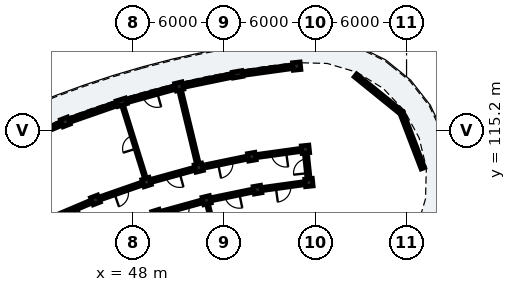
"""IFC4 building model, lengths in metres.
Left out: names, types, materials, properties, quantities, classifications, styles, units other than length and angle.
Written with IfcOpenShell. Run it as: python <this file> out.ifc"""

import sys

from ifc_helpers import new_model, si_unit, direction, frame, frame_2d, origin, origin_2d, place, context, subcontext, project, spatial, rectangle, extrude, element, fill, save


model = new_model("IFC4")
c1 = context("Model", 3, precision=1e-05, world=origin(), true_north=direction((0.0, 1.0)))
c2 = subcontext(c1, "Body", "Model", "MODEL_VIEW")
j1 = project(units=[si_unit("LENGTHUNIT", "METRE"), si_unit("PLANEANGLEUNIT", "RADIAN")], contexts=[c1])
p1 = place(None, origin())
s1 = spatial("IfcSite", under=j1, at=p1, CompositionType="ELEMENT")
p2 = place(p1, origin())
s2 = spatial("IfcBuilding", under=s1, at=p2, CompositionType="ELEMENT")
p3 = place(p2, frame((0.0, 0.0, 29.0)))
s3 = spatial("IfcBuildingStorey", under=s2, at=p3, CompositionType="ELEMENT", Elevation=29.0)
for number, where, z_axis, x_axis in (
    (1, (59.58, 111.766, 0.0), (0.0, 0.0, 1.0), (-0.105, 0.995, 0.0)),
    (2, (59.35, 113.954, 0.0), (0.0, 0.0, 1.0), (-0.105, 0.995, 0.0)),
    (3, (58.775, 119.424, 0.0), (0.0, 0.0, 1.0), (-0.105, 0.995, 0.0)),
    (4, (56.194, 111.297, 0.0), (0.0, 0.0, 1.0), (-0.17, 0.985, 0.0)),
    (5, (55.821, 113.465, 0.0), (0.0, 0.0, 1.0), (-0.17, 0.985, 0.0)),
):
    element("IfcColumn", number, at=place(p3, frame(where, z_axis=z_axis, x_axis=x_axis)), inside=s3, PredefinedType="COLUMN", context=c2, shape_type="SweptSolid", body=[
        extrude(rectangle(XDim=0.5, YDim=0.5, at=origin_2d()), origin(), (0.0, 0.0, 1.0), 3.115),
    ])
p4 = place(p3, frame((54.887, 118.885, 0.0), z_axis=(0.0, 0.0, 1.0), x_axis=(-0.169827298811, 0.985473839622, 0.0)))
e6 = element("IfcColumn", 6, at=p4, inside=s3, PredefinedType="PILASTER", context=c2, shape_type="SweptSolid", body=[
    extrude(rectangle(XDim=0.39, YDim=0.63, at=origin_2d()), origin(), (0.0, 0.0, 1.0), 3.115),
])
for number, where, z_axis, x_axis in (
    (7, (52.847, 110.606, 0.0), (0.0, 0.0, 1.0), (-0.234, 0.972, 0.0)),
    (8, (52.331, 112.744, 0.0), (0.0, 0.0, 1.0), (-0.234, 0.972, 0.0)),
    (9, (51.042, 118.091, 0.0), (0.0, 0.0, 1.0), (-0.234, 0.972, 0.0)),
    (10, (49.552, 109.695, 0.0), (0.0, 0.0, 1.0), (-0.298, 0.955, 0.0)),
    (11, (48.897, 111.795, 0.0), (0.0, 0.0, 1.0), (-0.298, 0.955, 0.0)),
):
    element("IfcColumn", number, at=place(p3, frame(where, z_axis=z_axis, x_axis=x_axis)), inside=s3, PredefinedType="COLUMN", context=c2, shape_type="SweptSolid", body=[
        extrude(rectangle(XDim=0.5, YDim=0.5, at=origin_2d()), origin(), (0.0, 0.0, 1.0), 3.115),
    ])
p5 = place(p3, frame((47.258, 117.046, 0.0), z_axis=(0.0, 0.0, 1.0), x_axis=(-0.297930292146, 0.954587628781, 0.0)))
e12 = element("IfcColumn", 12, at=p5, inside=s3, PredefinedType="PILASTER", context=c2, shape_type="SweptSolid", body=[
    extrude(rectangle(XDim=0.39, YDim=0.63, at=origin_2d()), origin(), (0.0, 0.0, 1.0), 3.115),
])
for number, where, z_axis, x_axis in (
    (13, (45.532, 110.622, 0.0), (0.0, 0.0, 1.0), (-0.36, 0.933, 0.0)),
    (14, (43.552, 115.753, 0.0), (0.0, 0.0, 1.0), (-0.36, 0.933, 0.0)),
):
    element("IfcColumn", number, at=place(p3, frame(where, z_axis=z_axis, x_axis=x_axis)), inside=s3, PredefinedType="COLUMN", context=c2, shape_type="SweptSolid", body=[
        extrude(rectangle(XDim=0.5, YDim=0.5, at=origin_2d()), origin(), (0.0, 0.0, 1.0), 3.115),
    ])
p6 = place(p3, frame((58.557, 119.394, 0.0), z_axis=(0.0, 0.0, 1.0), x_axis=(-0.990540496422, -0.137220716177, 0.0)))
e15 = element("IfcWall", 15, at=p6, inside=s3, PredefinedType="SOLIDWALL", context=c2, shape_type="SweptSolid", body=[
    extrude(rectangle(XDim=3.541, YDim=0.245, at=frame_2d((1.77, 0.0))), origin(), (0.0, 0.0, 1.0), 2.355),
])
p7 = place(p6, frame((0.995, 0.0, 0.35)))
e16 = element("IfcOpeningElement", 16, at=p7, cuts=e15, PredefinedType="OPENING", context=c2, shape_type="SweptSolid", body=[
    extrude(rectangle(XDim=1.55, YDim=1.75, at=frame_2d((0.775, 0.875))), frame((0.0, 0.133, 0.0), z_axis=(0.0, -1.0, 0.0), x_axis=(1.0, 0.0, 0.0)), (0.0, 0.0, 1.0), 0.265),
])
p8 = place(p3, frame((54.725, 118.852, 0.0), z_axis=(0.0, 0.0, 1.0), x_axis=(-0.979336300967, -0.202238496848, 0.0)))
e17 = element("IfcWall", 17, at=p8, inside=s3, PredefinedType="SOLIDWALL", context=c2, shape_type="SweptSolid", body=[
    extrude(rectangle(XDim=3.541, YDim=0.245, at=frame_2d((1.771, 0.0))), origin(), (0.0, 0.0, 1.0), 2.355),
])
p9 = place(p8, frame((0.92, 0.0, 0.35)))
e18 = element("IfcOpeningElement", 18, at=p9, cuts=e17, PredefinedType="OPENING", context=c2, shape_type="SweptSolid", body=[
    extrude(rectangle(XDim=1.7, YDim=1.8, at=frame_2d((0.85, 0.9))), frame((0.0, 0.133, 0.0), z_axis=(0.0, -1.0, 0.0), x_axis=(1.0, 0.0, 0.0)), (0.0, 0.0, 1.0), 0.265),
])
p10 = place(p3, frame((50.83, 118.032, 0.0), z_axis=(0.0, 0.0, 1.0), x_axis=(-0.963891366843, -0.266295762125, 0.0)))
e19 = element("IfcWall", 19, at=p10, inside=s3, PredefinedType="SOLIDWALL", context=c2, shape_type="SweptSolid", body=[
    extrude(rectangle(XDim=3.541, YDim=0.245, at=frame_2d((1.771, 0.0))), origin(), (0.0, 0.0, 1.0), 2.355),
])
p11 = place(p10, frame((1.28, 0.0, 0.0)))
e20 = element("IfcOpeningElement", 20, at=p11, cuts=e19, PredefinedType="OPENING", context=c2, shape_type="SweptSolid", body=[
    extrude(rectangle(XDim=0.98, YDim=2.12, at=frame_2d((0.49, 1.06))), frame((0.0, 0.133, 0.0), z_axis=(0.0, -1.0, 0.0), x_axis=(1.0, 0.0, 0.0)), (0.0, 0.0, 1.0), 0.265),
])
p12 = place(p3, frame((47.103, 116.991, 0.0), z_axis=(0.0, 0.0, 1.0), x_axis=(-0.944250036963, -0.329229202373, 0.0)))
e21 = element("IfcWall", 21, at=p12, inside=s3, PredefinedType="SOLIDWALL", context=c2, shape_type="SweptSolid", body=[
    extrude(rectangle(XDim=3.541, YDim=0.245, at=frame_2d((1.771, 0.0))), origin(), (0.0, 0.0, 1.0), 2.355),
])
p13 = place(p12, frame((1.08, 0.0, 0.55)))
e22 = element("IfcOpeningElement", 22, at=p13, cuts=e21, PredefinedType="OPENING", context=c2, shape_type="SweptSolid", body=[
    extrude(rectangle(XDim=1.38, YDim=1.56, at=frame_2d((0.69, 0.78))), frame((0.0, 0.133, 0.0), z_axis=(0.0, -1.0, 0.0), x_axis=(1.0, 0.0, 0.0)), (0.0, 0.0, 1.0), 0.265),
])
p14 = place(p3, frame((43.349, 115.667, 0.0), z_axis=(0.0, 0.0, 1.0), x_axis=(-0.920498375564, -0.390746389088, 0.0)))
e23 = element("IfcWall", 23, at=p14, inside=s3, PredefinedType="SOLIDWALL", context=c2, shape_type="SweptSolid", body=[
    extrude(rectangle(XDim=3.541, YDim=0.245, at=frame_2d((1.771, 0.0))), origin(), (0.0, 0.0, 1.0), 2.355),
])
p15 = place(p14, frame((1.19, 0.0, 0.55)))
e24 = element("IfcOpeningElement", 24, at=p15, cuts=e23, PredefinedType="OPENING", context=c2, shape_type="SweptSolid", body=[
    extrude(rectangle(XDim=1.16, YDim=1.485, at=frame_2d((0.58, 0.743))), frame((0.0, 0.133, 0.0), z_axis=(0.0, -1.0, 0.0), x_axis=(1.0, 0.0, 0.0)), (0.0, 0.0, 1.0), 0.265),
])
p16 = place(p3, frame((62.635, 118.812, 0.0), z_axis=(0.0, 0.0, 1.0), x_axis=(0.777137204109, -0.629331205321, 0.0)))
e25 = element("IfcWall", 25, at=p16, inside=s3, PredefinedType="SOLIDWALL", context=c2, shape_type="SweptSolid", body=[
    extrude(rectangle(XDim=3.908, YDim=0.245, at=frame_2d((1.954, 0.0))), origin(), (0.0, 0.0, 1.0), 2.355),
])
p17 = place(p16, frame((0.979, 0.0, 0.4)))
e26 = element("IfcOpeningElement", 26, at=p17, cuts=e25, PredefinedType="OPENING", context=c2, shape_type="SweptSolid", body=[
    extrude(rectangle(XDim=1.95, YDim=1.78, at=frame_2d((0.975, 0.89))), frame((0.0, 0.133, 0.0), z_axis=(0.0, -1.0, 0.0), x_axis=(1.0, 0.0, 0.0)), (0.0, 0.0, 1.0), 0.265),
])
p18 = place(p3, frame((65.673, 116.353, 0.0), z_axis=(0.0, 0.0, 1.0), x_axis=(0.358376224971, -0.933577249817, 0.0)))
e27 = element("IfcWall", 27, at=p18, inside=s3, PredefinedType="SOLIDWALL", context=c2, shape_type="SweptSolid", body=[
    extrude(rectangle(XDim=3.908, YDim=0.245, at=frame_2d((1.954, 0.0))), origin(), (0.0, 0.0, 1.0), 2.355),
])
p19 = place(p3, frame((59.004, 113.906, 0.0), z_axis=(0.0, 0.0, 1.0), x_axis=(-0.990544162976, -0.137194246211, 0.0)))
e28 = element("IfcWall", 28, at=p19, inside=s3, PredefinedType="PARTITIONING", context=c2, shape_type="SweptSolid", body=[
    extrude(rectangle(XDim=2.863, YDim=0.205, at=frame_2d((1.432, 0.0))), origin(), (0.0, 0.0, 1.0), 2.37),
])
p20 = place(p19, frame((0.937, 0.0, 0.0)))
e29 = element("IfcOpeningElement", 29, at=p20, cuts=e28, PredefinedType="OPENING", context=c2, shape_type="SweptSolid", body=[
    extrude(rectangle(XDim=0.99, YDim=2.16, at=frame_2d((0.495, 1.08))), frame((0.0, 0.113, 0.0), z_axis=(0.0, -1.0, 0.0), x_axis=(1.0, 0.0, 0.0)), (0.0, 0.0, 1.0), 0.225),
])
p21 = place(p3, frame((59.233, 111.718, 0.0), z_axis=(0.0, 0.0, 1.0), x_axis=(-0.990535404475, -0.137257467855, 0.0)))
e30 = element("IfcWall", 30, at=p21, inside=s3, PredefinedType="PARTITIONING", context=c2, shape_type="SweptSolid", body=[
    extrude(rectangle(XDim=2.718, YDim=0.205, at=frame_2d((1.359, 0.0))), origin(), (0.0, 0.0, 1.0), 2.37),
])
p22 = place(p21, frame((0.864, 0.0, 0.0)))
e31 = element("IfcOpeningElement", 31, at=p22, cuts=e30, PredefinedType="OPENING", context=c2, shape_type="SweptSolid", body=[
    extrude(rectangle(XDim=0.99, YDim=2.16, at=frame_2d((0.495, 1.08))), frame((0.0, 0.113, 0.0), z_axis=(0.0, -1.0, 0.0), x_axis=(1.0, 0.0, 0.0)), (0.0, 0.0, 1.0), 0.225),
])
p23 = place(p3, frame((55.478, 113.394, 0.0), z_axis=(0.0, 0.0, 1.0), x_axis=(-0.979348418612, -0.202179808492, 0.0)))
e32 = element("IfcWall", 32, at=p23, inside=s3, PredefinedType="PARTITIONING", context=c2, shape_type="SweptSolid", body=[
    extrude(rectangle(XDim=2.863, YDim=0.205, at=frame_2d((1.432, 0.0))), origin(), (0.0, 0.0, 1.0), 2.37),
])
p24 = place(p23, frame((0.947, 0.0, 0.0)))
e33 = element("IfcOpeningElement", 33, at=p24, cuts=e32, PredefinedType="OPENING", context=c2, shape_type="SweptSolid", body=[
    extrude(rectangle(XDim=0.97, YDim=2.15, at=frame_2d((0.485, 1.075))), frame((0.0, 0.113, 0.0), z_axis=(0.0, -1.0, 0.0), x_axis=(1.0, 0.0, 0.0)), (0.0, 0.0, 1.0), 0.225),
])
p25 = place(p3, frame((55.852, 111.226, 0.0), z_axis=(0.0, 0.0, 1.0), x_axis=(-0.979349423541, -0.202174940608, 0.0)))
e34 = element("IfcWall", 34, at=p25, inside=s3, PredefinedType="PARTITIONING", context=c2, shape_type="SweptSolid", body=[
    extrude(rectangle(XDim=2.718, YDim=0.205, at=frame_2d((1.359, 0.0))), origin(), (0.0, 0.0, 1.0), 2.37),
])
p26 = place(p25, frame((0.874, 0.0, 0.0)))
e35 = element("IfcOpeningElement", 35, at=p26, cuts=e34, PredefinedType="OPENING", context=c2, shape_type="SweptSolid", body=[
    extrude(rectangle(XDim=0.97, YDim=2.15, at=frame_2d((0.485, 1.075))), frame((0.0, 0.113, 0.0), z_axis=(0.0, -1.0, 0.0), x_axis=(1.0, 0.0, 0.0)), (0.0, 0.0, 1.0), 0.225),
])
p27 = place(p3, frame((52.238, 113.133, 0.0), z_axis=(0.0, 0.0, 1.0), x_axis=(-0.234386624934, 0.972143461662, 0.0)))
e36 = element("IfcWall", 36, at=p27, inside=s3, PredefinedType="PARTITIONING", context=c2, shape_type="SweptSolid", body=[
    extrude(rectangle(XDim=4.7, YDim=0.185, at=frame_2d((2.35, 0.0))), origin(), (0.0, 0.0, 1.0), 2.37),
])
p28 = place(p3, frame((54.488, 103.801, 0.0), z_axis=(0.0, 0.0, 1.0), x_axis=(-0.234406698576, 0.972138621629, 0.0)))
e37 = element("IfcWall", 37, at=p28, inside=s3, PredefinedType="PARTITIONING", context=c2, shape_type="SweptSolid", body=[
    extrude(rectangle(XDim=6.6, YDim=0.125, at=frame_2d((3.3, 0.0))), origin(), (0.0, 0.0, 1.0), 2.37),
])
p29 = place(p28, frame((2.855, 0.0, 0.0)))
e38 = element("IfcOpeningElement", 38, at=p29, cuts=e37, PredefinedType="OPENING", context=c2, shape_type="SweptSolid", body=[
    extrude(rectangle(XDim=0.89, YDim=2.1, at=frame_2d((0.445, 1.05))), frame((0.0, 0.073, 0.0), z_axis=(0.0, -1.0, 0.0), x_axis=(1.0, 0.0, 0.0)), (0.0, 0.0, 1.0), 0.145),
])
p30 = place(p3, frame((51.994, 112.651, 0.0), z_axis=(0.0, 0.0, 1.0), x_axis=(-0.963890789093, -0.266297853356, 0.0)))
e39 = element("IfcWall", 39, at=p30, inside=s3, PredefinedType="PARTITIONING", context=c2, shape_type="SweptSolid", body=[
    extrude(rectangle(XDim=2.863, YDim=0.205, at=frame_2d((1.432, 0.0))), origin(), (0.0, 0.0, 1.0), 2.37),
])
p31 = place(p30, frame((0.957, 0.0, 0.0)))
e40 = element("IfcOpeningElement", 40, at=p31, cuts=e39, PredefinedType="OPENING", context=c2, shape_type="SweptSolid", body=[
    extrude(rectangle(XDim=0.95, YDim=2.13, at=frame_2d((0.475, 1.065))), frame((0.0, 0.113, 0.0), z_axis=(0.0, -1.0, 0.0), x_axis=(1.0, 0.0, 0.0)), (0.0, 0.0, 1.0), 0.225),
])
p32 = place(p3, frame((52.51, 110.512, 0.0), z_axis=(0.0, 0.0, 1.0), x_axis=(-0.96388375821, -0.266323301006, 0.0)))
e41 = element("IfcWall", 41, at=p32, inside=s3, PredefinedType="PARTITIONING", context=c2, shape_type="SweptSolid", body=[
    extrude(rectangle(XDim=2.718, YDim=0.205, at=frame_2d((1.359, 0.0))), origin(), (0.0, 0.0, 1.0), 2.37),
])
p33 = place(p32, frame((0.884, 0.0, 0.0)))
e42 = element("IfcOpeningElement", 42, at=p33, cuts=e41, PredefinedType="OPENING", context=c2, shape_type="SweptSolid", body=[
    extrude(rectangle(XDim=0.95, YDim=2.13, at=frame_2d((0.475, 1.065))), frame((0.0, 0.113, 0.0), z_axis=(0.0, -1.0, 0.0), x_axis=(1.0, 0.0, 0.0)), (0.0, 0.0, 1.0), 0.225),
])
p34 = place(p3, frame((48.778, 112.177, 0.0), z_axis=(0.0, 0.0, 1.0), x_axis=(-0.297905254614, 0.954595442726, 0.0)))
e43 = element("IfcWall", 43, at=p34, inside=s3, PredefinedType="PARTITIONING", context=c2, shape_type="SweptSolid", body=[
    extrude(rectangle(XDim=4.7, YDim=0.125, at=frame_2d((2.35, 0.0))), origin(), (0.0, 0.0, 1.0), 2.37),
])
p35 = place(p34, frame((1.905, 0.0, 0.0)))
e44 = element("IfcOpeningElement", 44, at=p35, cuts=e43, PredefinedType="OPENING", context=c2, shape_type="SweptSolid", body=[
    extrude(rectangle(XDim=0.89, YDim=2.1, at=frame_2d((0.445, 1.05))), frame((0.0, 0.073, 0.0), z_axis=(0.0, -1.0, 0.0), x_axis=(1.0, 0.0, 0.0)), (0.0, 0.0, 1.0), 0.145),
])
p36 = place(p3, frame((48.566, 111.68, 0.0), z_axis=(0.0, 0.0, 1.0), x_axis=(-0.944253820929, -0.329218349522, 0.0)))
e45 = element("IfcWall", 45, at=p36, inside=s3, PredefinedType="PARTITIONING", context=c2, shape_type="SweptSolid", body=[
    extrude(rectangle(XDim=2.863, YDim=0.205, at=frame_2d((1.432, 0.0))), origin(), (0.0, 0.0, 1.0), 2.37),
])
p37 = place(p36, frame((0.967, 0.0, 0.0)))
e46 = element("IfcOpeningElement", 46, at=p37, cuts=e45, PredefinedType="OPENING", context=c2, shape_type="SweptSolid", body=[
    extrude(rectangle(XDim=0.93, YDim=2.12, at=frame_2d((0.465, 1.06))), frame((0.0, 0.113, 0.0), z_axis=(0.0, -1.0, 0.0), x_axis=(1.0, 0.0, 0.0)), (0.0, 0.0, 1.0), 0.225),
])
p38 = place(p3, frame((45.21, 110.486, 0.0), z_axis=(0.0, 0.0, 1.0), x_axis=(-0.920511160294, -0.390716270168, 0.0)))
e47 = element("IfcWall", 47, at=p38, inside=s3, PredefinedType="PARTITIONING", context=c2, shape_type="SweptSolid", body=[
    extrude(rectangle(XDim=2.863, YDim=0.205, at=frame_2d((1.432, 0.0))), origin(), (0.0, 0.0, 1.0), 2.37),
])
p39 = place(p38, frame((0.937, 0.0, 0.0)))
e48 = element("IfcOpeningElement", 48, at=p39, cuts=e47, PredefinedType="OPENING", context=c2, shape_type="SweptSolid", body=[
    extrude(rectangle(XDim=0.99, YDim=2.16, at=frame_2d((0.495, 1.08))), frame((0.0, 0.113, 0.0), z_axis=(0.0, -1.0, 0.0), x_axis=(1.0, 0.0, 0.0)), (0.0, 0.0, 1.0), 0.225),
])
p40 = place(p3, frame((59.575, 111.816, 0.0), z_axis=(0.0, 0.0, 1.0), x_axis=(-0.104509292252, 0.994523910136, 0.0)))
e49 = element("IfcWall", 49, at=p40, inside=s3, PredefinedType="PARTITIONING", context=c2, shape_type="SweptSolid", body=[
    extrude(rectangle(XDim=2.1, YDim=0.205, at=frame_2d((1.05, 0.0))), origin(), (0.0, 0.0, 1.0), 2.37),
])
p41 = place(p40, frame((0.57, 0.0, 0.0)))
e50 = element("IfcOpeningElement", 50, at=p41, cuts=e49, PredefinedType="OPENING", context=c2, shape_type="SweptSolid", body=[
    extrude(rectangle(XDim=0.95, YDim=2.13, at=frame_2d((0.475, 1.065))), frame((0.0, 0.113, 0.0), z_axis=(0.0, -1.0, 0.0), x_axis=(1.0, 0.0, 0.0)), (0.0, 0.0, 1.0), 0.225),
])
p42 = place(p7, origin())
e51 = element("IfcWindow", 51, at=p42, inside=s3, PartitioningType="SINGLE_PANEL", PredefinedType="WINDOW", context=c2, shape_type="SweptSolid", body=[
    extrude(rectangle(XDim=1.55, YDim=1.75, at=frame_2d((0.775, 0.875))), frame((0.0, 0.03, 0.0), z_axis=(0.0, -1.0, 0.0), x_axis=(1.0, 0.0, 0.0)), (0.0, 0.0, 1.0), 0.06),
])
fill(e16, e51)
p43 = place(p9, origin())
e52 = element("IfcWindow", 52, at=p43, inside=s3, PartitioningType="SINGLE_PANEL", PredefinedType="WINDOW", context=c2, shape_type="SweptSolid", body=[
    extrude(rectangle(XDim=1.7, YDim=1.8, at=frame_2d((0.85, 0.9))), frame((0.0, 0.03, 0.0), z_axis=(0.0, -1.0, 0.0), x_axis=(1.0, 0.0, 0.0)), (0.0, 0.0, 1.0), 0.06),
])
fill(e18, e52)
p44 = place(p11, origin())
e53 = element("IfcDoor", 53, at=p44, inside=s3, OperationType="SINGLE_SWING_LEFT", PredefinedType="DOOR", context=c2, shape_type="SweptSolid", body=[
    extrude(rectangle(XDim=0.98, YDim=2.12, at=frame_2d((0.49, 1.06))), frame((0.0, 0.025, 0.0), z_axis=(0.0, -1.0, 0.0), x_axis=(1.0, 0.0, 0.0)), (0.0, 0.0, 1.0), 0.05),
])
fill(e20, e53)
p45 = place(p13, origin())
e54 = element("IfcWindow", 54, at=p45, inside=s3, PartitioningType="SINGLE_PANEL", PredefinedType="WINDOW", context=c2, shape_type="SweptSolid", body=[
    extrude(rectangle(XDim=1.38, YDim=1.56, at=frame_2d((0.69, 0.78))), frame((0.0, 0.03, 0.0), z_axis=(0.0, -1.0, 0.0), x_axis=(1.0, 0.0, 0.0)), (0.0, 0.0, 1.0), 0.06),
])
fill(e22, e54)
p46 = place(p17, origin())
e55 = element("IfcWindow", 55, at=p46, inside=s3, PartitioningType="SINGLE_PANEL", PredefinedType="WINDOW", context=c2, shape_type="SweptSolid", body=[
    extrude(rectangle(XDim=1.95, YDim=1.78, at=frame_2d((0.975, 0.89))), frame((0.0, 0.03, 0.0), z_axis=(0.0, -1.0, 0.0), x_axis=(1.0, 0.0, 0.0)), (0.0, 0.0, 1.0), 0.06),
])
fill(e26, e55)
p47 = place(p20, origin())
e56 = element("IfcDoor", 56, at=p47, inside=s3, OperationType="SINGLE_SWING_LEFT", PredefinedType="DOOR", context=c2, shape_type="SweptSolid", body=[
    extrude(rectangle(XDim=0.99, YDim=2.16, at=frame_2d((0.495, 1.08))), frame((0.0, 0.025, 0.0), z_axis=(0.0, -1.0, 0.0), x_axis=(1.0, 0.0, 0.0)), (0.0, 0.0, 1.0), 0.05),
])
fill(e29, e56)
p48 = place(p22, origin())
e57 = element("IfcDoor", 57, at=p48, inside=s3, OperationType="SINGLE_SWING_RIGHT", PredefinedType="DOOR", context=c2, shape_type="SweptSolid", body=[
    extrude(rectangle(XDim=0.99, YDim=2.16, at=frame_2d((0.495, 1.08))), frame((0.0, 0.025, 0.0), z_axis=(0.0, -1.0, 0.0), x_axis=(1.0, 0.0, 0.0)), (0.0, 0.0, 1.0), 0.05),
])
fill(e31, e57)
p49 = place(p24, origin())
e58 = element("IfcDoor", 58, at=p49, inside=s3, OperationType="SINGLE_SWING_RIGHT", PredefinedType="DOOR", context=c2, shape_type="SweptSolid", body=[
    extrude(rectangle(XDim=0.97, YDim=2.15, at=frame_2d((0.485, 1.075))), frame((0.0, 0.025, 0.0), z_axis=(0.0, -1.0, 0.0), x_axis=(1.0, 0.0, 0.0)), (0.0, 0.0, 1.0), 0.05),
])
fill(e33, e58)
p50 = place(p26, origin())
e59 = element("IfcDoor", 59, at=p50, inside=s3, OperationType="SINGLE_SWING_LEFT", PredefinedType="DOOR", context=c2, shape_type="SweptSolid", body=[
    extrude(rectangle(XDim=0.97, YDim=2.15, at=frame_2d((0.485, 1.075))), frame((0.0, 0.025, 0.0), z_axis=(0.0, -1.0, 0.0), x_axis=(1.0, 0.0, 0.0)), (0.0, 0.0, 1.0), 0.05),
])
fill(e35, e59)
p51 = place(p31, origin())
e60 = element("IfcDoor", 60, at=p51, inside=s3, OperationType="SINGLE_SWING_LEFT", PredefinedType="DOOR", context=c2, shape_type="SweptSolid", body=[
    extrude(rectangle(XDim=0.95, YDim=2.13, at=frame_2d((0.475, 1.065))), frame((0.0, 0.025, 0.0), z_axis=(0.0, -1.0, 0.0), x_axis=(1.0, 0.0, 0.0)), (0.0, 0.0, 1.0), 0.05),
])
fill(e40, e60)
p52 = place(p33, origin())
e61 = element("IfcDoor", 61, at=p52, inside=s3, OperationType="SINGLE_SWING_RIGHT", PredefinedType="DOOR", context=c2, shape_type="SweptSolid", body=[
    extrude(rectangle(XDim=0.95, YDim=2.13, at=frame_2d((0.475, 1.065))), frame((0.0, 0.025, 0.0), z_axis=(0.0, -1.0, 0.0), x_axis=(1.0, 0.0, 0.0)), (0.0, 0.0, 1.0), 0.05),
])
fill(e42, e61)
p53 = place(p35, origin())
e62 = element("IfcDoor", 62, at=p53, inside=s3, OperationType="SINGLE_SWING_LEFT", PredefinedType="DOOR", context=c2, shape_type="SweptSolid", body=[
    extrude(rectangle(XDim=0.89, YDim=2.1, at=frame_2d((0.445, 1.05))), frame((0.0, 0.025, 0.0), z_axis=(0.0, -1.0, 0.0), x_axis=(1.0, 0.0, 0.0)), (0.0, 0.0, 1.0), 0.05),
])
fill(e44, e62)
p54 = place(p37, origin())
e63 = element("IfcDoor", 63, at=p54, inside=s3, OperationType="SINGLE_SWING_RIGHT", PredefinedType="DOOR", context=c2, shape_type="SweptSolid", body=[
    extrude(rectangle(XDim=0.93, YDim=2.12, at=frame_2d((0.465, 1.06))), frame((0.0, 0.025, 0.0), z_axis=(0.0, -1.0, 0.0), x_axis=(1.0, 0.0, 0.0)), (0.0, 0.0, 1.0), 0.05),
])
fill(e46, e63)
p55 = place(p39, origin())
e64 = element("IfcDoor", 64, at=p55, inside=s3, OperationType="SINGLE_SWING_LEFT", PredefinedType="DOOR", context=c2, shape_type="SweptSolid", body=[
    extrude(rectangle(XDim=0.99, YDim=2.16, at=frame_2d((0.495, 1.08))), frame((0.0, 0.025, 0.0), z_axis=(0.0, -1.0, 0.0), x_axis=(1.0, 0.0, 0.0)), (0.0, 0.0, 1.0), 0.05),
])
fill(e48, e64)
p56 = place(p41, origin())
e65 = element("IfcDoor", 65, at=p56, inside=s3, OperationType="SINGLE_SWING_LEFT", PredefinedType="DOOR", context=c2, shape_type="SweptSolid", body=[
    extrude(rectangle(XDim=0.95, YDim=2.13, at=frame_2d((0.475, 1.065))), frame((0.0, 0.025, 0.0), z_axis=(0.0, -1.0, 0.0), x_axis=(1.0, 0.0, 0.0)), (0.0, 0.0, 1.0), 0.05),
])
fill(e50, e65)
save(model, sys.argv[1])
